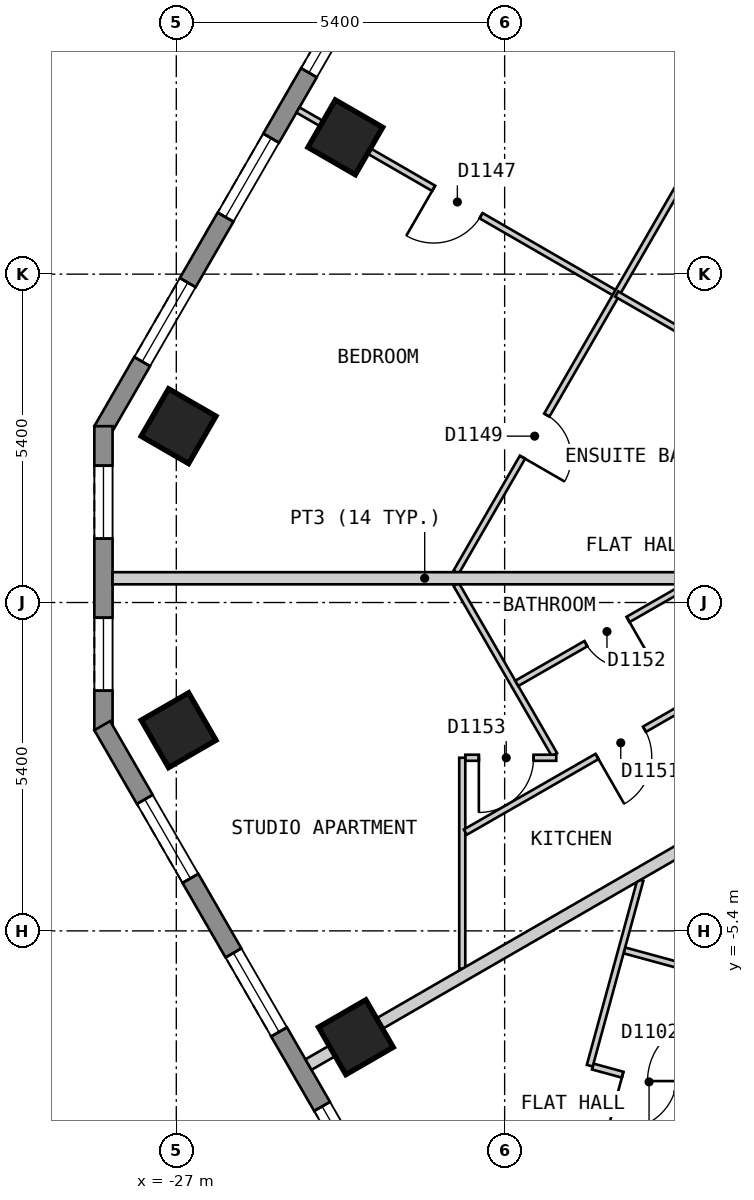
"""IFC4 building model, lengths in metres.
Left out: names, types, materials, properties, quantities, classifications, styles, units other than length and angle.
Written with IfcOpenShell. Run it as: python <this file> out.ifc"""

import sys

from ifc_helpers import new_model, si_unit, direction, frame, frame_2d, origin, origin_2d, place, context, subcontext, project, spatial, polyline, rectangle, outline, extrude, element, fill, save


model = new_model("IFC4")
c1 = context("Model", 3, precision=1e-05, world=origin(), true_north=direction((0.0, 1.0)))
c2 = subcontext(c1, "Body", "Model", "MODEL_VIEW")
j1 = project(units=[si_unit("LENGTHUNIT", "METRE"), si_unit("PLANEANGLEUNIT", "RADIAN")], contexts=[c1])
p1 = place(None, origin())
s1 = spatial("IfcSite", under=j1, at=p1, CompositionType="ELEMENT")
p2 = place(p1, origin())
s2 = spatial("IfcBuilding", under=s1, at=p2, CompositionType="ELEMENT")
p3 = place(p2, frame((0.0, 0.0, 150.6)))
s3 = spatial("IfcBuildingStorey", under=s2, at=p3, CompositionType="ELEMENT", Elevation=150.6)
for number, where, z_axis, x_axis in (
    (1, (-24.22, 7.65, 0.0), (0.0, 0.0, 1.0), (-0.5, -0.866, 0.0)),
    (2, (-26.963, 2.9, 0.0), (0.0, 0.0, 1.0), (-0.5, -0.866, 0.0)),
    (3, (-26.962, -2.1, 0.0), (0.0, 0.0, 1.0), (0.5, -0.866, 0.0)),
    (4, (-24.047, -7.149, 0.0), (0.0, 0.0, 1.0), (0.5, -0.866, 0.0)),
):
    element("IfcColumn", number, at=place(p3, frame(where, z_axis=z_axis, x_axis=x_axis)), inside=s3, PredefinedType="COLUMN", context=c2, shape_type="SweptSolid", body=[
        extrude(rectangle(XDim=0.9, YDim=0.9, at=origin_2d()), origin(), (0.0, 0.0, 1.0), 3.0),
    ])
p4 = place(p3, frame((-16.555, 23.025, 0.0), z_axis=(0.0, 0.0, 1.0), x_axis=(-0.500020536353, -0.866013546791, 0.0)))
e5 = element("IfcWall", 5, at=p4, inside=s3, PredefinedType="SOLIDWALL", context=c2, shape_type="SweptSolid", body=[
    extrude(outline(polyline([(0.0, -0.15), (23.325, -0.15), (23.245, 0.15), (0.08, 0.15), (0.0, -0.15)])), origin(), (0.0, 0.0, 1.0), 2.6),
])
p5 = place(p4, frame((1.314, 0.0, 0.15)))
e6 = element("IfcOpeningElement", 6, at=p5, cuts=e5, PredefinedType="OPENING", context=c2, shape_type="SweptSolid", body=[
    extrude(rectangle(XDim=1.5, YDim=2.1, at=frame_2d((0.75, 1.05))), frame((0.0, 0.16, 0.0), z_axis=(0.0, -1.0, 0.0), x_axis=(1.0, 0.0, 0.0)), (0.0, 0.0, 1.0), 0.32),
])
p6 = place(p4, frame((4.056, 0.0, 0.15)))
e7 = element("IfcOpeningElement", 7, at=p6, cuts=e5, PredefinedType="OPENING", context=c2, shape_type="SweptSolid", body=[
    extrude(rectangle(XDim=1.5, YDim=2.1, at=frame_2d((0.75, 1.05))), frame((0.0, 0.16, 0.0), z_axis=(0.0, -1.0, 0.0), x_axis=(1.0, 0.0, 0.0)), (0.0, 0.0, 1.0), 0.32),
])
p7 = place(p4, frame((6.799, 0.0, 0.15)))
e8 = element("IfcOpeningElement", 8, at=p7, cuts=e5, PredefinedType="OPENING", context=c2, shape_type="SweptSolid", body=[
    extrude(rectangle(XDim=1.5, YDim=2.1, at=frame_2d((0.75, 1.05))), frame((0.0, 0.16, 0.0), z_axis=(0.0, -1.0, 0.0), x_axis=(1.0, 0.0, 0.0)), (0.0, 0.0, 1.0), 0.32),
])
p8 = place(p4, frame((9.541, 0.0, 0.15)))
e9 = element("IfcOpeningElement", 9, at=p8, cuts=e5, PredefinedType="OPENING", context=c2, shape_type="SweptSolid", body=[
    extrude(rectangle(XDim=1.5, YDim=2.1, at=frame_2d((0.75, 1.05))), frame((0.0, 0.16, 0.0), z_axis=(0.0, -1.0, 0.0), x_axis=(1.0, 0.0, 0.0)), (0.0, 0.0, 1.0), 0.32),
])
p9 = place(p4, frame((12.285, 0.0, 0.15)))
e10 = element("IfcOpeningElement", 10, at=p9, cuts=e5, PredefinedType="OPENING", context=c2, shape_type="SweptSolid", body=[
    extrude(rectangle(XDim=1.5, YDim=2.1, at=frame_2d((0.75, 1.05))), frame((0.0, 0.16, 0.0), z_axis=(0.0, -1.0, 0.0), x_axis=(1.0, 0.0, 0.0)), (0.0, 0.0, 1.0), 0.32),
])
p10 = place(p4, frame((15.027, 0.0, 0.15)))
e11 = element("IfcOpeningElement", 11, at=p10, cuts=e5, PredefinedType="OPENING", context=c2, shape_type="SweptSolid", body=[
    extrude(rectangle(XDim=1.5, YDim=2.1, at=frame_2d((0.75, 1.05))), frame((0.0, 0.16, 0.0), z_axis=(0.0, -1.0, 0.0), x_axis=(1.0, 0.0, 0.0)), (0.0, 0.0, 1.0), 0.32),
])
p11 = place(p4, frame((17.769, 0.0, 0.15)))
e12 = element("IfcOpeningElement", 12, at=p11, cuts=e5, PredefinedType="OPENING", context=c2, shape_type="SweptSolid", body=[
    extrude(rectangle(XDim=1.5, YDim=2.1, at=frame_2d((0.75, 1.05))), frame((0.0, 0.16, 0.0), z_axis=(0.0, -1.0, 0.0), x_axis=(1.0, 0.0, 0.0)), (0.0, 0.0, 1.0), 0.32),
])
p12 = place(p4, frame((20.512, 0.0, 0.15)))
e13 = element("IfcOpeningElement", 13, at=p12, cuts=e5, PredefinedType="OPENING", context=c2, shape_type="SweptSolid", body=[
    extrude(rectangle(XDim=1.5, YDim=2.1, at=frame_2d((0.75, 1.05))), frame((0.0, 0.16, 0.0), z_axis=(0.0, -1.0, 0.0), x_axis=(1.0, 0.0, 0.0)), (0.0, 0.0, 1.0), 0.32),
])
p13 = place(p3, frame((-28.198, 2.9, 0.0), z_axis=(0.0, 0.0, 1.0), x_axis=(0.0, -1.0, 0.0)))
e14 = element("IfcWall", 14, at=p13, inside=s3, PredefinedType="SOLIDWALL", context=c2, shape_type="SweptSolid", body=[
    extrude(outline(polyline([(0.0, -0.15), (5.0, -0.15), (4.92, 0.15), (0.08, 0.15), (0.0, -0.15)])), origin(), (0.0, 0.0, 1.0), 2.6),
])
p14 = place(p13, frame((0.65, 0.0, 0.15)))
e15 = element("IfcOpeningElement", 15, at=p14, cuts=e14, PredefinedType="OPENING", context=c2, shape_type="SweptSolid", body=[
    extrude(rectangle(XDim=1.2, YDim=2.1, at=frame_2d((0.6, 1.05))), frame((0.0, 0.16, 0.0), z_axis=(0.0, -1.0, 0.0), x_axis=(1.0, 0.0, 0.0)), (0.0, 0.0, 1.0), 0.32),
])
p15 = place(p13, frame((3.15, 0.0, 0.15)))
e16 = element("IfcOpeningElement", 16, at=p15, cuts=e14, PredefinedType="OPENING", context=c2, shape_type="SweptSolid", body=[
    extrude(rectangle(XDim=1.2, YDim=2.1, at=frame_2d((0.6, 1.05))), frame((0.0, 0.16, 0.0), z_axis=(0.0, -1.0, 0.0), x_axis=(1.0, 0.0, 0.0)), (0.0, 0.0, 1.0), 0.32),
])
p16 = place(p3, frame((-28.218, -2.025, 0.0), z_axis=(0.0, 0.0, 1.0), x_axis=(0.500017503135, -0.866015298109, 0.0)))
e17 = element("IfcWall", 17, at=p16, inside=s3, PredefinedType="SOLIDWALL", context=c2, shape_type="SweptSolid", body=[
    extrude(outline(polyline([(0.0, -0.15), (24.711, -0.15), (24.631, 0.15), (0.08, 0.15), (0.0, -0.15)])), origin(), (0.0, 0.0, 1.0), 2.6),
])
p17 = place(p16, frame((1.4, 0.0, 0.15)))
e18 = element("IfcOpeningElement", 18, at=p17, cuts=e17, PredefinedType="OPENING", context=c2, shape_type="SweptSolid", body=[
    extrude(rectangle(XDim=1.5, YDim=2.1, at=frame_2d((0.75, 1.05))), frame((0.0, 0.16, 0.0), z_axis=(0.0, -1.0, 0.0), x_axis=(1.0, 0.0, 0.0)), (0.0, 0.0, 1.0), 0.32),
])
p18 = place(p16, frame((4.316, 0.0, 0.15)))
e19 = element("IfcOpeningElement", 19, at=p18, cuts=e17, PredefinedType="OPENING", context=c2, shape_type="SweptSolid", body=[
    extrude(rectangle(XDim=1.5, YDim=2.1, at=frame_2d((0.75, 1.05))), frame((0.0, 0.16, 0.0), z_axis=(0.0, -1.0, 0.0), x_axis=(1.0, 0.0, 0.0)), (0.0, 0.0, 1.0), 0.32),
])
p19 = place(p16, frame((7.231, 0.0, 0.15)))
e20 = element("IfcOpeningElement", 20, at=p19, cuts=e17, PredefinedType="OPENING", context=c2, shape_type="SweptSolid", body=[
    extrude(rectangle(XDim=1.5, YDim=2.1, at=frame_2d((0.75, 1.05))), frame((0.0, 0.16, 0.0), z_axis=(0.0, -1.0, 0.0), x_axis=(1.0, 0.0, 0.0)), (0.0, 0.0, 1.0), 0.32),
])
p20 = place(p16, frame((10.147, 0.0, 0.15)))
e21 = element("IfcOpeningElement", 21, at=p20, cuts=e17, PredefinedType="OPENING", context=c2, shape_type="SweptSolid", body=[
    extrude(rectangle(XDim=1.5, YDim=2.1, at=frame_2d((0.75, 1.05))), frame((0.0, 0.16, 0.0), z_axis=(0.0, -1.0, 0.0), x_axis=(1.0, 0.0, 0.0)), (0.0, 0.0, 1.0), 0.32),
])
p21 = place(p16, frame((13.062, 0.0, 0.15)))
e22 = element("IfcOpeningElement", 22, at=p21, cuts=e17, PredefinedType="OPENING", context=c2, shape_type="SweptSolid", body=[
    extrude(rectangle(XDim=1.5, YDim=2.1, at=frame_2d((0.75, 1.05))), frame((0.0, 0.16, 0.0), z_axis=(0.0, -1.0, 0.0), x_axis=(1.0, 0.0, 0.0)), (0.0, 0.0, 1.0), 0.32),
])
p22 = place(p16, frame((15.977, 0.0, 0.15)))
e23 = element("IfcOpeningElement", 23, at=p22, cuts=e17, PredefinedType="OPENING", context=c2, shape_type="SweptSolid", body=[
    extrude(rectangle(XDim=1.5, YDim=2.1, at=frame_2d((0.75, 1.05))), frame((0.0, 0.16, 0.0), z_axis=(0.0, -1.0, 0.0), x_axis=(1.0, 0.0, 0.0)), (0.0, 0.0, 1.0), 0.32),
])
p23 = place(p16, frame((18.893, 0.0, 0.15)))
e24 = element("IfcOpeningElement", 24, at=p23, cuts=e17, PredefinedType="OPENING", context=c2, shape_type="SweptSolid", body=[
    extrude(rectangle(XDim=1.5, YDim=2.1, at=frame_2d((0.75, 1.05))), frame((0.0, 0.16, 0.0), z_axis=(0.0, -1.0, 0.0), x_axis=(1.0, 0.0, 0.0)), (0.0, 0.0, 1.0), 0.32),
])
p24 = place(p16, frame((21.809, 0.0, 0.15)))
e25 = element("IfcOpeningElement", 25, at=p24, cuts=e17, PredefinedType="OPENING", context=c2, shape_type="SweptSolid", body=[
    extrude(rectangle(XDim=1.5, YDim=2.1, at=frame_2d((0.75, 1.05))), frame((0.0, 0.16, 0.0), z_axis=(0.0, -1.0, 0.0), x_axis=(1.0, 0.0, 0.0)), (0.0, 0.0, 1.0), 0.32),
])
p25 = place(p3, frame((-22.398, 0.299, 0.0), z_axis=(0.0, 0.0, 1.0), x_axis=(0.50004249738, -0.86600086652, 0.0)))
e26 = element("IfcWall", 26, at=p25, inside=s3, PredefinedType="PARTITIONING", context=c2, shape_type="SweptSolid", body=[
    extrude(rectangle(XDim=3.236, YDim=0.1, at=frame_2d((1.618, 0.0))), origin(), (0.0, 0.0, 1.0), 2.6),
])
p26 = place(p3, frame((-19.631, -5.721, 0.0), z_axis=(0.0, 0.0, 1.0), x_axis=(0.964816035809, -0.262925877475, 0.0)))
e27 = element("IfcWall", 27, at=p26, inside=s3, PredefinedType="PARTITIONING", context=c2, shape_type="SweptSolid", body=[
    extrude(rectangle(XDim=3.344, YDim=0.1, at=frame_2d((1.672, 0.0))), origin(), (0.0, 0.0, 1.0), 2.6),
])
p27 = place(p26, frame((1.047, 0.0, 0.0)))
e28 = element("IfcOpeningElement", 28, at=p27, cuts=e27, PredefinedType="OPENING", context=c2, shape_type="SweptSolid", body=[
    extrude(rectangle(XDim=0.8, YDim=2.1, at=frame_2d((0.4, 1.05))), frame((0.0, 0.06, 0.0), z_axis=(0.0, -1.0, 0.0), x_axis=(1.0, 0.0, 0.0)), (0.0, 0.0, 1.0), 0.12),
])
p28 = place(p3, frame((-20.151, -7.631, 0.0), z_axis=(0.0, 0.0, 1.0), x_axis=(0.964784947449, -0.263039930765, 0.0)))
e29 = element("IfcWall", 29, at=p28, inside=s3, PredefinedType="PARTITIONING", context=c2, shape_type="SweptSolid", body=[
    extrude(rectangle(XDim=1.866, YDim=0.1, at=frame_2d((0.933, 0.0))), origin(), (0.0, 0.0, 1.0), 2.6),
])
p29 = place(p28, frame((0.51, 0.0, 0.0)))
e30 = element("IfcOpeningElement", 30, at=p29, cuts=e29, PredefinedType="OPENING", context=c2, shape_type="SweptSolid", body=[
    extrude(rectangle(XDim=0.9, YDim=2.1, at=frame_2d((0.45, 1.05))), frame((0.0, 0.06, 0.0), z_axis=(0.0, -1.0, 0.0), x_axis=(1.0, 0.0, 0.0)), (0.0, 0.0, 1.0), 0.12),
])
p30 = place(p3, frame((-24.999, 8.1, 0.0), z_axis=(0.0, 0.0, 1.0), x_axis=(0.865978029808, -0.500082045158, 0.0)))
e31 = element("IfcWall", 31, at=p30, inside=s3, PredefinedType="PARTITIONING", context=c2, shape_type="SweptSolid", body=[
    extrude(rectangle(XDim=6.053, YDim=0.1, at=frame_2d((3.027, 0.0))), origin(), (0.0, 0.0, 1.0), 2.6),
])
p31 = place(p30, frame((2.577, 0.0, 0.0)))
e32 = element("IfcOpeningElement", 32, at=p31, cuts=e31, PredefinedType="OPENING", context=c2, shape_type="SweptSolid", body=[
    extrude(rectangle(XDim=0.9, YDim=2.1, at=frame_2d((0.45, 1.05))), frame((0.0, 0.06, 0.0), z_axis=(0.0, -1.0, 0.0), x_axis=(1.0, 0.0, 0.0)), (0.0, 0.0, 1.0), 0.12),
])
p32 = place(p3, frame((-22.247, -2.553, 0.0), z_axis=(0.0, 0.0, 1.0), x_axis=(1.0, 0.0, 0.0)))
e33 = element("IfcWall", 33, at=p32, inside=s3, PredefinedType="PARTITIONING", context=c2, shape_type="SweptSolid", body=[
    extrude(rectangle(XDim=1.496, YDim=0.1, at=frame_2d((0.748, 0.0))), origin(), (0.0, 0.0, 1.0), 2.6),
])
p33 = place(p32, frame((0.223, 0.0, 0.0)))
e34 = element("IfcOpeningElement", 34, at=p33, cuts=e33, PredefinedType="OPENING", context=c2, shape_type="SweptSolid", body=[
    extrude(rectangle(XDim=0.9, YDim=2.1, at=frame_2d((0.45, 1.05))), frame((0.0, 0.06, 0.0), z_axis=(0.0, -1.0, 0.0), x_axis=(1.0, 0.0, 0.0)), (0.0, 0.0, 1.0), 0.12),
])
p34 = place(p3, frame((-22.398, 0.499, 0.0), z_axis=(0.0, 0.0, 1.0), x_axis=(0.499981561717, 0.866036048871, 0.0)))
e35 = element("IfcWall", 35, at=p34, inside=s3, PredefinedType="PARTITIONING", context=c2, shape_type="SweptSolid", body=[
    extrude(rectangle(XDim=21.532, YDim=0.1, at=frame_2d((10.766, 0.0))), origin(), (0.0, 0.0, 1.0), 2.6),
])
p35 = place(p34, frame((13.049, 0.0, 0.0)))
e36 = element("IfcOpeningElement", 36, at=p35, cuts=e35, PredefinedType="OPENING", context=c2, shape_type="SweptSolid", body=[
    extrude(rectangle(XDim=0.9, YDim=2.1, at=frame_2d((0.45, 1.05))), frame((0.0, 0.06, 0.0), z_axis=(0.0, -1.0, 0.0), x_axis=(1.0, 0.0, 0.0)), (0.0, 0.0, 1.0), 0.12),
])
p36 = place(p34, frame((2.183, 0.0, 0.0)))
e37 = element("IfcOpeningElement", 37, at=p36, cuts=e35, PredefinedType="OPENING", context=c2, shape_type="SweptSolid", body=[
    extrude(rectangle(XDim=0.8, YDim=2.1, at=frame_2d((0.4, 1.05))), frame((0.0, 0.06, 0.0), z_axis=(0.0, -1.0, 0.0), x_axis=(1.0, 0.0, 0.0)), (0.0, 0.0, 1.0), 0.12),
])
p37 = place(p3, frame((-20.2, -7.617, 0.0), z_axis=(0.0, 0.0, 1.0), x_axis=(0.263150035392, 0.964754921663, 0.0)))
e38 = element("IfcWall", 38, at=p37, inside=s3, PredefinedType="PARTITIONING", context=c2, shape_type="SweptSolid", body=[
    extrude(rectangle(XDim=3.166, YDim=0.1, at=frame_2d((1.583, 0.0))), origin(), (0.0, 0.0, 1.0), 2.6),
])
p38 = place(p3, frame((-22.297, -6.023, 0.0), z_axis=(0.0, 0.0, 1.0), x_axis=(0.0, 1.0, 0.0)))
e39 = element("IfcWall", 39, at=p38, inside=s3, PredefinedType="PARTITIONING", context=c2, shape_type="SweptSolid", body=[
    extrude(rectangle(XDim=3.47, YDim=0.1, at=frame_2d((1.735, 0.0))), origin(), (0.0, 0.0, 1.0), 2.6),
])
p39 = place(p3, frame((-22.247, -3.776, 0.0), z_axis=(0.0, 0.0, 1.0), x_axis=(0.867243093247, 0.497884943752, 0.0)))
e40 = element("IfcWall", 40, at=p39, inside=s3, PredefinedType="PARTITIONING", context=c2, shape_type="SweptSolid", body=[
    extrude(rectangle(XDim=5.854, YDim=0.1, at=frame_2d((2.927, 0.0))), origin(), (0.0, 0.0, 1.0), 2.6),
])
p40 = place(p39, frame((2.498, 0.0, 0.0)))
e41 = element("IfcOpeningElement", 41, at=p40, cuts=e40, PredefinedType="OPENING", context=c2, shape_type="SweptSolid", body=[
    extrude(rectangle(XDim=0.9, YDim=2.1, at=frame_2d((0.45, 1.05))), frame((0.0, 0.06, 0.0), z_axis=(0.0, -1.0, 0.0), x_axis=(1.0, 0.0, 0.0)), (0.0, 0.0, 1.0), 0.12),
])
p41 = place(p3, frame((-21.4, -1.329, 0.0), z_axis=(0.0, 0.0, 1.0), x_axis=(0.867235187435, 0.497898714274, 0.0)))
e42 = element("IfcWall", 42, at=p41, inside=s3, PredefinedType="PARTITIONING", context=c2, shape_type="SweptSolid", body=[
    extrude(rectangle(XDim=3.27, YDim=0.1, at=frame_2d((1.635, 0.0))), origin(), (0.0, 0.0, 1.0), 2.6),
])
p42 = place(p41, frame((1.31, 0.0, 0.0)))
e43 = element("IfcOpeningElement", 43, at=p42, cuts=e42, PredefinedType="OPENING", context=c2, shape_type="SweptSolid", body=[
    extrude(rectangle(XDim=0.8, YDim=2.1, at=frame_2d((0.4, 1.05))), frame((0.0, 0.06, 0.0), z_axis=(0.0, -1.0, 0.0), x_axis=(1.0, 0.0, 0.0)), (0.0, 0.0, 1.0), 0.12),
])
p43 = place(p3, frame((-28.048, 0.399, 0.0), z_axis=(0.0, 0.0, 1.0), x_axis=(1.0, 0.0, 0.0)))
e44 = element("IfcWall", 44, at=p43, inside=s3, PredefinedType="PARTITIONING", context=c2, shape_type="SweptSolid", body=[
    extrude(rectangle(XDim=10.266, YDim=0.2, at=frame_2d((5.133, 0.0))), origin(), (0.0, 0.0, 1.0), 2.6),
])
p44 = place(p3, frame((-24.826, -7.599, 0.0), z_axis=(0.0, 0.0, 1.0), x_axis=(0.866031973572, 0.499988620622, 0.0)))
e45 = element("IfcWall", 45, at=p44, inside=s3, PredefinedType="PARTITIONING", context=c2, shape_type="SweptSolid", body=[
    extrude(rectangle(XDim=7.728, YDim=0.2, at=frame_2d((3.864, 0.0))), origin(), (0.0, 0.0, 1.0), 2.6),
])
p45 = place(p3, frame((-19.757, 5.073, 0.0), z_axis=(0.0, 0.0, 1.0), x_axis=(0.866076396086, -0.499911668341, 0.0)))
e46 = element("IfcWall", 46, at=p45, inside=s3, PredefinedType="PARTITIONING", context=c2, shape_type="SweptSolid", body=[
    extrude(rectangle(XDim=3.947, YDim=0.1, at=frame_2d((1.973, 0.0))), origin(), (0.0, 0.0, 1.0), 2.6),
])
p46 = place(p10, origin())
e47 = element("IfcWindow", 47, at=p46, inside=s3, PartitioningType="SINGLE_PANEL", PredefinedType="WINDOW", context=c2, shape_type="SweptSolid", body=[
    extrude(rectangle(XDim=1.5, YDim=2.1, at=frame_2d((0.75, 1.05))), frame((0.0, 0.03, 0.0), z_axis=(0.0, -1.0, 0.0), x_axis=(1.0, 0.0, 0.0)), (0.0, 0.0, 1.0), 0.06),
])
fill(e11, e47)
p47 = place(p11, origin())
e48 = element("IfcWindow", 48, at=p47, inside=s3, PartitioningType="SINGLE_PANEL", PredefinedType="WINDOW", context=c2, shape_type="SweptSolid", body=[
    extrude(rectangle(XDim=1.5, YDim=2.1, at=frame_2d((0.75, 1.05))), frame((0.0, 0.03, 0.0), z_axis=(0.0, -1.0, 0.0), x_axis=(1.0, 0.0, 0.0)), (0.0, 0.0, 1.0), 0.06),
])
fill(e12, e48)
p48 = place(p12, origin())
e49 = element("IfcWindow", 49, at=p48, inside=s3, PartitioningType="SINGLE_PANEL", PredefinedType="WINDOW", context=c2, shape_type="SweptSolid", body=[
    extrude(rectangle(XDim=1.5, YDim=2.1, at=frame_2d((0.75, 1.05))), frame((0.0, 0.03, 0.0), z_axis=(0.0, -1.0, 0.0), x_axis=(1.0, 0.0, 0.0)), (0.0, 0.0, 1.0), 0.06),
])
fill(e13, e49)
p49 = place(p14, origin())
e50 = element("IfcWindow", 50, at=p49, inside=s3, PartitioningType="SINGLE_PANEL", PredefinedType="WINDOW", context=c2, shape_type="SweptSolid", body=[
    extrude(rectangle(XDim=1.2, YDim=2.1, at=frame_2d((0.6, 1.05))), frame((0.0, 0.03, 0.0), z_axis=(0.0, -1.0, 0.0), x_axis=(1.0, 0.0, 0.0)), (0.0, 0.0, 1.0), 0.06),
])
fill(e15, e50)
p50 = place(p15, origin())
e51 = element("IfcWindow", 51, at=p50, inside=s3, PartitioningType="SINGLE_PANEL", PredefinedType="WINDOW", context=c2, shape_type="SweptSolid", body=[
    extrude(rectangle(XDim=1.2, YDim=2.1, at=frame_2d((0.6, 1.05))), frame((0.0, 0.03, 0.0), z_axis=(0.0, -1.0, 0.0), x_axis=(1.0, 0.0, 0.0)), (0.0, 0.0, 1.0), 0.06),
])
fill(e16, e51)
p51 = place(p17, origin())
e52 = element("IfcWindow", 52, at=p51, inside=s3, PartitioningType="SINGLE_PANEL", PredefinedType="WINDOW", context=c2, shape_type="SweptSolid", body=[
    extrude(rectangle(XDim=1.5, YDim=2.1, at=frame_2d((0.75, 1.05))), frame((0.0, 0.03, 0.0), z_axis=(0.0, -1.0, 0.0), x_axis=(1.0, 0.0, 0.0)), (0.0, 0.0, 1.0), 0.06),
])
fill(e18, e52)
p52 = place(p18, origin())
e53 = element("IfcWindow", 53, at=p52, inside=s3, PartitioningType="SINGLE_PANEL", PredefinedType="WINDOW", context=c2, shape_type="SweptSolid", body=[
    extrude(rectangle(XDim=1.5, YDim=2.1, at=frame_2d((0.75, 1.05))), frame((0.0, 0.03, 0.0), z_axis=(0.0, -1.0, 0.0), x_axis=(1.0, 0.0, 0.0)), (0.0, 0.0, 1.0), 0.06),
])
fill(e19, e53)
p53 = place(p19, origin())
e54 = element("IfcWindow", 54, at=p53, inside=s3, PartitioningType="SINGLE_PANEL", PredefinedType="WINDOW", context=c2, shape_type="SweptSolid", body=[
    extrude(rectangle(XDim=1.5, YDim=2.1, at=frame_2d((0.75, 1.05))), frame((0.0, 0.03, 0.0), z_axis=(0.0, -1.0, 0.0), x_axis=(1.0, 0.0, 0.0)), (0.0, 0.0, 1.0), 0.06),
])
fill(e20, e54)
p54 = place(p29, origin())
e55 = element("IfcDoor", 55, at=p54, inside=s3, OperationType="SINGLE_SWING_LEFT", PredefinedType="DOOR", context=c2, shape_type="SweptSolid", body=[
    extrude(rectangle(XDim=0.9, YDim=2.1, at=frame_2d((0.45, 1.05))), frame((0.0, 0.025, 0.0), z_axis=(0.0, -1.0, 0.0), x_axis=(1.0, 0.0, 0.0)), (0.0, 0.0, 1.0), 0.05),
])
fill(e30, e55)
p55 = place(p31, origin())
e56 = element("IfcDoor", 56, at=p55, inside=s3, OperationType="SINGLE_SWING_LEFT", PredefinedType="DOOR", context=c2, shape_type="SweptSolid", body=[
    extrude(rectangle(XDim=0.9, YDim=2.1, at=frame_2d((0.45, 1.05))), frame((0.0, 0.025, 0.0), z_axis=(0.0, -1.0, 0.0), x_axis=(1.0, 0.0, 0.0)), (0.0, 0.0, 1.0), 0.05),
])
fill(e32, e56)
p56 = place(p36, origin())
e57 = element("IfcDoor", 57, at=p56, inside=s3, OperationType="SINGLE_SWING_LEFT", PredefinedType="DOOR", context=c2, shape_type="SweptSolid", body=[
    extrude(rectangle(XDim=0.8, YDim=2.1, at=frame_2d((0.4, 1.05))), frame((0.0, 0.025, 0.0), z_axis=(0.0, -1.0, 0.0), x_axis=(1.0, 0.0, 0.0)), (0.0, 0.0, 1.0), 0.05),
])
fill(e37, e57)
p57 = place(p40, origin())
e58 = element("IfcDoor", 58, at=p57, inside=s3, OperationType="SINGLE_SWING_LEFT", PredefinedType="DOOR", context=c2, shape_type="SweptSolid", body=[
    extrude(rectangle(XDim=0.9, YDim=2.1, at=frame_2d((0.45, 1.05))), frame((0.0, 0.025, 0.0), z_axis=(0.0, -1.0, 0.0), x_axis=(1.0, 0.0, 0.0)), (0.0, 0.0, 1.0), 0.05),
])
fill(e41, e58)
p58 = place(p42, origin())
e59 = element("IfcDoor", 59, at=p58, inside=s3, OperationType="SINGLE_SWING_RIGHT", PredefinedType="DOOR", context=c2, shape_type="SweptSolid", body=[
    extrude(rectangle(XDim=0.8, YDim=2.1, at=frame_2d((0.4, 1.05))), frame((0.0, 0.025, 0.0), z_axis=(0.0, -1.0, 0.0), x_axis=(1.0, 0.0, 0.0)), (0.0, 0.0, 1.0), 0.05),
])
fill(e43, e59)
p59 = place(p33, origin())
e60 = element("IfcDoor", 60, at=p59, inside=s3, OperationType="SINGLE_SWING_LEFT", PredefinedType="DOOR", context=c2, shape_type="SweptSolid", body=[
    extrude(rectangle(XDim=0.9, YDim=2.1, at=frame_2d((0.45, 1.05))), frame((0.0, 0.025, 0.0), z_axis=(0.0, -1.0, 0.0), x_axis=(1.0, 0.0, 0.0)), (0.0, 0.0, 1.0), 0.05),
])
fill(e34, e60)
save(model, sys.argv[1])
